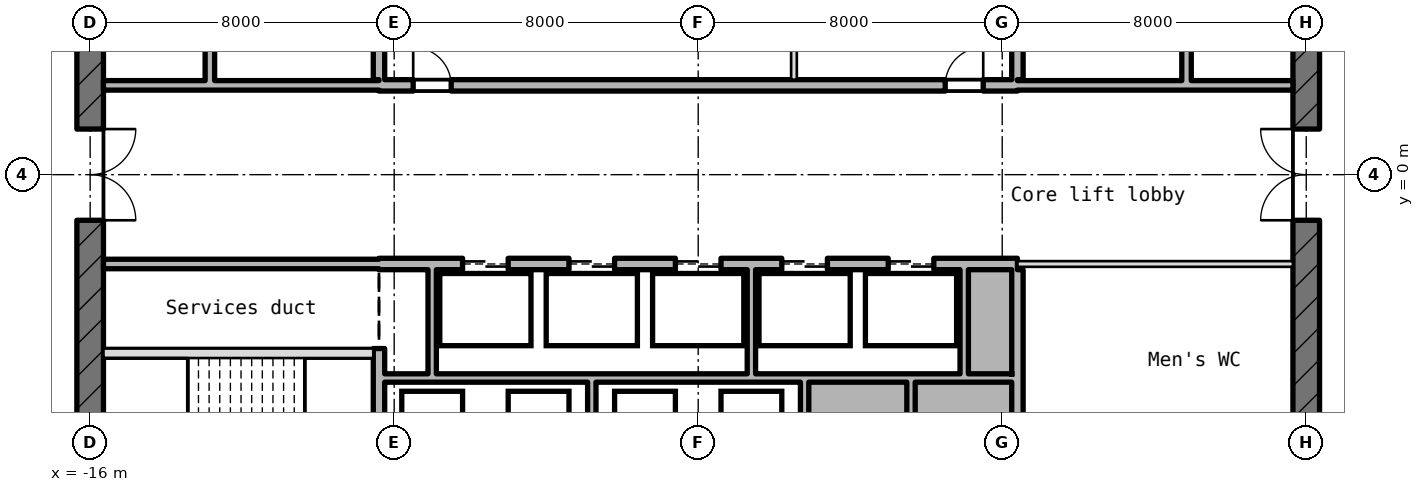
"""IFC4 building model, lengths in metres.
Left out: names, types, materials, properties, quantities, classifications, styles, units other than length and angle.
Written with IfcOpenShell. Run it as: python <this file> out.ifc"""

import sys

from ifc_helpers import new_model, si_unit, direction, frame, frame_2d, origin, place, context, subcontext, project, spatial, rectangle, extrude, element, fill, save


model = new_model("IFC4")
c1 = context("Model", 3, precision=1e-05, world=origin(), true_north=direction((0.0, 1.0)))
c2 = subcontext(c1, "Body", "Model", "MODEL_VIEW")
j1 = project(units=[si_unit("LENGTHUNIT", "METRE"), si_unit("PLANEANGLEUNIT", "RADIAN")], contexts=[c1])
p1 = place(None, origin())
s1 = spatial("IfcSite", under=j1, at=p1, CompositionType="ELEMENT")
p2 = place(p1, origin())
s2 = spatial("IfcBuilding", under=s1, at=p2, CompositionType="ELEMENT")
p3 = place(p2, frame((0.0, 0.0, 359.2)))
s3 = spatial("IfcBuildingStorey", under=s2, at=p3, CompositionType="ELEMENT", Elevation=359.2)
p4 = place(p3, frame((16.0, -10.145, -0.18), z_axis=(0.0, 0.0, 1.0), x_axis=(0.0, 1.0, 0.0)))
e1 = element("IfcWall", 1, at=p4, inside=s3, PredefinedType="SHEAR", context=c2, shape_type="SweptSolid", body=[
    extrude(rectangle(XDim=20.29, YDim=0.7, at=frame_2d((10.145, 0.0))), origin(), (0.0, 0.0, 1.0), 4.15),
])
p5 = place(p4, frame((8.945, 0.0, 0.18)))
e2 = element("IfcOpeningElement", 2, at=p5, cuts=e1, PredefinedType="OPENING", context=c2, shape_type="SweptSolid", body=[
    extrude(rectangle(XDim=2.4, YDim=2.1, at=frame_2d((1.2, 1.05))), frame((0.0, 0.36, 0.0), z_axis=(0.0, -1.0, 0.0), x_axis=(1.0, 0.0, 0.0)), (0.0, 0.0, 1.0), 0.72),
])
p6 = place(p4, frame((13.545, 0.0, 0.18)))
e3 = element("IfcOpeningElement", 3, at=p6, cuts=e1, PredefinedType="OPENING", context=c2, shape_type="SweptSolid", body=[
    extrude(rectangle(XDim=1.2, YDim=2.1, at=frame_2d((0.6, 1.05))), frame((0.0, 0.36, 0.0), z_axis=(0.0, -1.0, 0.0), x_axis=(1.0, 0.0, 0.0)), (0.0, 0.0, 1.0), 0.72),
])
p7 = place(p4, frame((2.4, 0.0, 0.18)))
e4 = element("IfcOpeningElement", 4, at=p7, cuts=e1, PredefinedType="OPENING", context=c2, shape_type="SweptSolid", body=[
    extrude(rectangle(XDim=1.2, YDim=2.1, at=frame_2d((0.6, 1.05))), frame((0.0, 0.36, 0.0), z_axis=(0.0, -1.0, 0.0), x_axis=(1.0, 0.0, 0.0)), (0.0, 0.0, 1.0), 0.72),
])
p8 = place(p3, frame((-16.0, 10.145, -0.18), z_axis=(0.0, 0.0, 1.0), x_axis=(0.0, -1.0, 0.0)))
e5 = element("IfcWall", 5, at=p8, inside=s3, PredefinedType="SHEAR", context=c2, shape_type="SweptSolid", body=[
    extrude(rectangle(XDim=20.29, YDim=0.7, at=frame_2d((10.145, 0.0))), origin(), (0.0, 0.0, 1.0), 4.15),
])
p9 = place(p8, frame((8.945, 0.0, 0.18)))
e6 = element("IfcOpeningElement", 6, at=p9, cuts=e5, PredefinedType="OPENING", context=c2, shape_type="SweptSolid", body=[
    extrude(rectangle(XDim=2.4, YDim=2.1, at=frame_2d((1.2, 1.05))), frame((0.0, 0.36, 0.0), z_axis=(0.0, -1.0, 0.0), x_axis=(1.0, 0.0, 0.0)), (0.0, 0.0, 1.0), 0.72),
])
p10 = place(p8, frame((5.545, 0.0, 0.18)))
e7 = element("IfcOpeningElement", 7, at=p10, cuts=e5, PredefinedType="OPENING", context=c2, shape_type="SweptSolid", body=[
    extrude(rectangle(XDim=1.2, YDim=2.1, at=frame_2d((0.6, 1.05))), frame((0.0, 0.36, 0.0), z_axis=(0.0, -1.0, 0.0), x_axis=(1.0, 0.0, 0.0)), (0.0, 0.0, 1.0), 0.72),
])
p11 = place(p3, frame((-8.25, -5.35, 0.0), z_axis=(0.0, 0.0, 1.0), x_axis=(1.0, 0.0, 0.0)))
e8 = element("IfcWall", 8, at=p11, inside=s3, PredefinedType="STANDARD", context=c2, shape_type="SweptSolid", body=[
    extrude(rectangle(XDim=16.5, YDim=0.22, at=frame_2d((8.25, 0.0))), origin(), (0.0, 0.0, 1.0), 3.97),
])
p12 = place(p3, frame((-15.65, -4.7, -0.18), z_axis=(0.0, 0.0, 1.0), x_axis=(1.0, 0.0, 0.0)))
e9 = element("IfcWall", 9, at=p12, inside=s3, PredefinedType="SHEAR", context=c2, shape_type="SweptSolid", body=[
    extrude(rectangle(XDim=7.1, YDim=0.25, at=frame_2d((3.55, 0.0))), origin(), (0.0, 0.0, 1.0), 4.15),
])
p13 = place(p3, frame((-15.65, -2.35, 0.0), z_axis=(0.0, 0.0, 1.0), x_axis=(1.0, 0.0, 0.0)))
e10 = element("IfcWall", 10, at=p13, inside=s3, PredefinedType="STANDARD", context=c2, shape_type="SweptSolid", body=[
    extrude(rectangle(XDim=7.25, YDim=0.25, at=frame_2d((3.625, 0.0))), origin(), (0.0, 0.0, 1.0), 3.97),
])
p14 = place(p3, frame((-8.4, -2.35, -0.18), z_axis=(0.0, 0.0, 1.0), x_axis=(1.0, 0.0, 0.0)))
e11 = element("IfcWall", 11, at=p14, inside=s3, PredefinedType="SHEAR", context=c2, shape_type="SweptSolid", body=[
    extrude(rectangle(XDim=16.8, YDim=0.3, at=frame_2d((8.4, 0.0))), origin(), (0.0, 0.0, 1.0), 4.15),
])
p15 = place(p14, frame((2.2, 0.0, 0.18)))
e12 = element("IfcOpeningElement", 12, at=p15, cuts=e11, PredefinedType="OPENING", context=c2, shape_type="SweptSolid", body=[
    extrude(rectangle(XDim=1.2, YDim=2.1, at=frame_2d((0.6, 1.05))), frame((0.0, 0.16, 0.0), z_axis=(0.0, -1.0, 0.0), x_axis=(1.0, 0.0, 0.0)), (0.0, 0.0, 1.0), 0.32),
])
p16 = place(p14, frame((5.0, 0.0, 0.18)))
e13 = element("IfcOpeningElement", 13, at=p16, cuts=e11, PredefinedType="OPENING", context=c2, shape_type="SweptSolid", body=[
    extrude(rectangle(XDim=1.2, YDim=2.1, at=frame_2d((0.6, 1.05))), frame((0.0, 0.16, 0.0), z_axis=(0.0, -1.0, 0.0), x_axis=(1.0, 0.0, 0.0)), (0.0, 0.0, 1.0), 0.32),
])
p17 = place(p14, frame((7.8, 0.0, 0.18)))
e14 = element("IfcOpeningElement", 14, at=p17, cuts=e11, PredefinedType="OPENING", context=c2, shape_type="SweptSolid", body=[
    extrude(rectangle(XDim=1.2, YDim=2.1, at=frame_2d((0.6, 1.05))), frame((0.0, 0.16, 0.0), z_axis=(0.0, -1.0, 0.0), x_axis=(1.0, 0.0, 0.0)), (0.0, 0.0, 1.0), 0.32),
])
p18 = place(p14, frame((10.6, 0.0, 0.18)))
e15 = element("IfcOpeningElement", 15, at=p18, cuts=e11, PredefinedType="OPENING", context=c2, shape_type="SweptSolid", body=[
    extrude(rectangle(XDim=1.2, YDim=2.1, at=frame_2d((0.6, 1.05))), frame((0.0, 0.16, 0.0), z_axis=(0.0, -1.0, 0.0), x_axis=(1.0, 0.0, 0.0)), (0.0, 0.0, 1.0), 0.32),
])
p19 = place(p14, frame((13.4, 0.0, 0.18)))
e16 = element("IfcOpeningElement", 16, at=p19, cuts=e11, PredefinedType="OPENING", context=c2, shape_type="SweptSolid", body=[
    extrude(rectangle(XDim=1.2, YDim=2.1, at=frame_2d((0.6, 1.05))), frame((0.0, 0.16, 0.0), z_axis=(0.0, -1.0, 0.0), x_axis=(1.0, 0.0, 0.0)), (0.0, 0.0, 1.0), 0.32),
])
p20 = place(p3, frame((8.4, -2.35, 0.0), z_axis=(0.0, 0.0, 1.0), x_axis=(1.0, 0.0, 0.0)))
e17 = element("IfcWall", 17, at=p20, inside=s3, PredefinedType="PARTITIONING", context=c2, shape_type="SweptSolid", body=[
    extrude(rectangle(XDim=7.25, YDim=0.15, at=frame_2d((3.625, 0.0))), origin(), (0.0, 0.0, 1.0), 3.97),
])
p21 = place(p3, frame((-15.65, 2.35, 0.0), z_axis=(0.0, 0.0, 1.0), x_axis=(1.0, 0.0, 0.0)))
e18 = element("IfcWall", 18, at=p21, inside=s3, PredefinedType="STANDARD", context=c2, shape_type="SweptSolid", body=[
    extrude(rectangle(XDim=7.25, YDim=0.25, at=frame_2d((3.625, 0.0))), origin(), (0.0, 0.0, 1.0), 3.97),
])
p22 = place(p3, frame((-8.4, 2.35, -0.18), z_axis=(0.0, 0.0, 1.0), x_axis=(1.0, 0.0, 0.0)))
e19 = element("IfcWall", 19, at=p22, inside=s3, PredefinedType="SHEAR", context=c2, shape_type="SweptSolid", body=[
    extrude(rectangle(XDim=16.8, YDim=0.3, at=frame_2d((8.4, 0.0))), origin(), (0.0, 0.0, 1.0), 4.15),
])
p23 = place(p22, frame((0.9, 0.0, 0.18)))
e20 = element("IfcOpeningElement", 20, at=p23, cuts=e19, PredefinedType="OPENING", context=c2, shape_type="SweptSolid", body=[
    extrude(rectangle(XDim=1.0, YDim=2.1, at=frame_2d((0.5, 1.05))), frame((0.0, 0.16, 0.0), z_axis=(0.0, -1.0, 0.0), x_axis=(1.0, 0.0, 0.0)), (0.0, 0.0, 1.0), 0.32),
])
p24 = place(p22, frame((14.9, 0.0, 0.18)))
e21 = element("IfcOpeningElement", 21, at=p24, cuts=e19, PredefinedType="OPENING", context=c2, shape_type="SweptSolid", body=[
    extrude(rectangle(XDim=1.0, YDim=2.1, at=frame_2d((0.5, 1.05))), frame((0.0, 0.16, 0.0), z_axis=(0.0, -1.0, 0.0), x_axis=(1.0, 0.0, 0.0)), (0.0, 0.0, 1.0), 0.32),
])
p25 = place(p3, frame((8.4, 2.35, 0.0), z_axis=(0.0, 0.0, 1.0), x_axis=(1.0, 0.0, 0.0)))
e22 = element("IfcWall", 22, at=p25, inside=s3, PredefinedType="STANDARD", context=c2, shape_type="SweptSolid", body=[
    extrude(rectangle(XDim=7.25, YDim=0.25, at=frame_2d((3.625, 0.0))), origin(), (0.0, 0.0, 1.0), 3.97),
])
p26 = place(p3, frame((-12.85, 2.475, 0.0), z_axis=(0.0, 0.0, 1.0), x_axis=(0.0, 1.0, 0.0)))
e23 = element("IfcWall", 23, at=p26, inside=s3, PredefinedType="STANDARD", context=c2, shape_type="SweptSolid", body=[
    extrude(rectangle(XDim=3.05, YDim=0.25, at=frame_2d((1.525, 0.0))), origin(), (0.0, 0.0, 1.0), 3.97),
])
p27 = place(p3, frame((-8.4, -8.75, -0.18), z_axis=(0.0, 0.0, 1.0), x_axis=(0.0, 1.0, 0.0)))
e24 = element("IfcWall", 24, at=p27, inside=s3, PredefinedType="SHEAR", context=c2, shape_type="SweptSolid", body=[
    extrude(rectangle(XDim=4.175, YDim=0.3, at=frame_2d((2.087, 0.0))), origin(), (0.0, 0.0, 1.0), 4.15),
])
p28 = place(p3, frame((-8.4, 2.5, -0.18), z_axis=(0.0, 0.0, 1.0), x_axis=(0.0, 1.0, 0.0)))
e25 = element("IfcWall", 25, at=p28, inside=s3, PredefinedType="SHEAR", context=c2, shape_type="SweptSolid", body=[
    extrude(rectangle(XDim=5.85, YDim=0.3, at=frame_2d((2.925, 0.0))), origin(), (0.0, 0.0, 1.0), 4.15),
])
p29 = place(p3, frame((-7.0, -5.24, 0.0), z_axis=(0.0, 0.0, 1.0), x_axis=(0.0, 1.0, 0.0)))
e26 = element("IfcWall", 26, at=p29, inside=s3, PredefinedType="STANDARD", context=c2, shape_type="SweptSolid", body=[
    extrude(rectangle(XDim=2.74, YDim=0.22, at=frame_2d((1.37, 0.0))), origin(), (0.0, 0.0, 1.0), 3.97),
])
p30 = place(p3, frame((-2.8, -8.35, 0.0), z_axis=(0.0, 0.0, 1.0), x_axis=(0.0, 1.0, 0.0)))
e27 = element("IfcWall", 27, at=p30, inside=s3, PredefinedType="STANDARD", context=c2, shape_type="SweptSolid", body=[
    extrude(rectangle(XDim=2.89, YDim=0.22, at=frame_2d((1.445, 0.0))), origin(), (0.0, 0.0, 1.0), 3.97),
])
p31 = place(p3, frame((1.4, -5.24, 0.0), z_axis=(0.0, 0.0, 1.0), x_axis=(0.0, 1.0, 0.0)))
e28 = element("IfcWall", 28, at=p31, inside=s3, PredefinedType="STANDARD", context=c2, shape_type="SweptSolid", body=[
    extrude(rectangle(XDim=2.74, YDim=0.22, at=frame_2d((1.37, 0.0))), origin(), (0.0, 0.0, 1.0), 3.97),
])
p32 = place(p3, frame((2.52, 2.5, 0.0), z_axis=(0.0, 0.0, 1.0), x_axis=(0.0, 1.0, 0.0)))
e29 = element("IfcWall", 29, at=p32, inside=s3, PredefinedType="PARTITIONING", context=c2, shape_type="SweptSolid", body=[
    extrude(rectangle(XDim=2.775, YDim=0.15, at=frame_2d((1.387, 0.0))), origin(), (0.0, 0.0, 1.0), 3.97),
])
for number, where, z_axis, x_axis in (
    (30, (2.8, -8.24, 0.0), (0.0, 0.0, 1.0), (0.0, 1.0, 0.0)),
    (31, (5.6, -8.24, 0.0), (0.0, 0.0, 1.0), (0.0, 1.0, 0.0)),
):
    element("IfcWall", number, at=place(p3, frame(where, z_axis=z_axis, x_axis=x_axis)), inside=s3, PredefinedType="STANDARD", context=c2, shape_type="SweptSolid", body=[
        extrude(rectangle(XDim=2.78, YDim=0.22, at=frame_2d((1.39, 0.0))), origin(), (0.0, 0.0, 1.0), 3.97),
    ])
p33 = place(p3, frame((7.0, -5.24, 0.0), z_axis=(0.0, 0.0, 1.0), x_axis=(0.0, 1.0, 0.0)))
e32 = element("IfcWall", 32, at=p33, inside=s3, PredefinedType="STANDARD", context=c2, shape_type="SweptSolid", body=[
    extrude(rectangle(XDim=2.74, YDim=0.22, at=frame_2d((1.37, 0.0))), origin(), (0.0, 0.0, 1.0), 3.97),
])
for number, where, z_axis, x_axis in (
    (33, (8.4, -8.35, -0.18), (0.0, 0.0, 1.0), (0.0, 1.0, 0.0)),
    (34, (8.4, 2.5, -0.18), (0.0, 0.0, 1.0), (0.0, 1.0, 0.0)),
):
    element("IfcWall", number, at=place(p3, frame(where, z_axis=z_axis, x_axis=x_axis)), inside=s3, PredefinedType="SHEAR", context=c2, shape_type="SweptSolid", body=[
        extrude(rectangle(XDim=5.85, YDim=0.3, at=frame_2d((2.925, 0.0))), origin(), (0.0, 0.0, 1.0), 4.15),
    ])
p34 = place(p3, frame((12.85, 2.475, 0.0), z_axis=(0.0, 0.0, 1.0), x_axis=(0.0, 1.0, 0.0)))
e35 = element("IfcWall", 35, at=p34, inside=s3, PredefinedType="STANDARD", context=c2, shape_type="SweptSolid", body=[
    extrude(rectangle(XDim=3.05, YDim=0.25, at=frame_2d((1.525, 0.0))), origin(), (0.0, 0.0, 1.0), 3.97),
])
p35 = place(p15, origin())
e36 = element("IfcDoor", 36, at=p35, inside=s3, OperationType="DOUBLE_DOOR_SLIDING", PredefinedType="DOOR", context=c2, shape_type="SweptSolid", body=[
    extrude(rectangle(XDim=1.2, YDim=2.1, at=frame_2d((0.6, 1.05))), frame((0.0, 0.025, 0.0), z_axis=(0.0, -1.0, 0.0), x_axis=(1.0, 0.0, 0.0)), (0.0, 0.0, 1.0), 0.05),
])
fill(e12, e36)
p36 = place(p16, origin())
e37 = element("IfcDoor", 37, at=p36, inside=s3, OperationType="DOUBLE_DOOR_SLIDING", PredefinedType="DOOR", context=c2, shape_type="SweptSolid", body=[
    extrude(rectangle(XDim=1.2, YDim=2.1, at=frame_2d((0.6, 1.05))), frame((0.0, 0.025, 0.0), z_axis=(0.0, -1.0, 0.0), x_axis=(1.0, 0.0, 0.0)), (0.0, 0.0, 1.0), 0.05),
])
fill(e13, e37)
p37 = place(p17, origin())
e38 = element("IfcDoor", 38, at=p37, inside=s3, OperationType="DOUBLE_DOOR_SLIDING", PredefinedType="DOOR", context=c2, shape_type="SweptSolid", body=[
    extrude(rectangle(XDim=1.2, YDim=2.1, at=frame_2d((0.6, 1.05))), frame((0.0, 0.025, 0.0), z_axis=(0.0, -1.0, 0.0), x_axis=(1.0, 0.0, 0.0)), (0.0, 0.0, 1.0), 0.05),
])
fill(e14, e38)
p38 = place(p18, origin())
e39 = element("IfcDoor", 39, at=p38, inside=s3, OperationType="DOUBLE_DOOR_SLIDING", PredefinedType="DOOR", context=c2, shape_type="SweptSolid", body=[
    extrude(rectangle(XDim=1.2, YDim=2.1, at=frame_2d((0.6, 1.05))), frame((0.0, 0.025, 0.0), z_axis=(0.0, -1.0, 0.0), x_axis=(1.0, 0.0, 0.0)), (0.0, 0.0, 1.0), 0.05),
])
fill(e15, e39)
p39 = place(p19, origin())
e40 = element("IfcDoor", 40, at=p39, inside=s3, OperationType="DOUBLE_DOOR_SLIDING", PredefinedType="DOOR", context=c2, shape_type="SweptSolid", body=[
    extrude(rectangle(XDim=1.2, YDim=2.1, at=frame_2d((0.6, 1.05))), frame((0.0, 0.025, 0.0), z_axis=(0.0, -1.0, 0.0), x_axis=(1.0, 0.0, 0.0)), (0.0, 0.0, 1.0), 0.05),
])
fill(e16, e40)
p40 = place(p9, origin())
e41 = element("IfcDoor", 41, at=p40, inside=s3, OperationType="DOUBLE_DOOR_SINGLE_SWING", PredefinedType="DOOR", context=c2, shape_type="SweptSolid", body=[
    extrude(rectangle(XDim=2.4, YDim=2.1, at=frame_2d((1.2, 1.05))), frame((0.0, 0.025, 0.0), z_axis=(0.0, -1.0, 0.0), x_axis=(1.0, 0.0, 0.0)), (0.0, 0.0, 1.0), 0.05),
])
fill(e6, e41)
p41 = place(p5, origin())
e42 = element("IfcDoor", 42, at=p41, inside=s3, OperationType="DOUBLE_DOOR_SINGLE_SWING", PredefinedType="DOOR", context=c2, shape_type="SweptSolid", body=[
    extrude(rectangle(XDim=2.4, YDim=2.1, at=frame_2d((1.2, 1.05))), frame((0.0, 0.025, 0.0), z_axis=(0.0, -1.0, 0.0), x_axis=(1.0, 0.0, 0.0)), (0.0, 0.0, 1.0), 0.05),
])
fill(e2, e42)
p42 = place(p23, origin())
e43 = element("IfcDoor", 43, at=p42, inside=s3, OperationType="SINGLE_SWING_RIGHT", PredefinedType="DOOR", context=c2, shape_type="SweptSolid", body=[
    extrude(rectangle(XDim=1.0, YDim=2.1, at=frame_2d((0.5, 1.05))), frame((0.0, 0.025, 0.0), z_axis=(0.0, -1.0, 0.0), x_axis=(1.0, 0.0, 0.0)), (0.0, 0.0, 1.0), 0.05),
])
fill(e20, e43)
p43 = place(p24, origin())
e44 = element("IfcDoor", 44, at=p43, inside=s3, OperationType="SINGLE_SWING_RIGHT", PredefinedType="DOOR", context=c2, shape_type="SweptSolid", body=[
    extrude(rectangle(XDim=1.0, YDim=2.1, at=frame_2d((0.5, 1.05))), frame((0.0, 0.025, 0.0), z_axis=(0.0, -1.0, 0.0), x_axis=(1.0, 0.0, 0.0)), (0.0, 0.0, 1.0), 0.05),
])
fill(e21, e44)
save(model, sys.argv[1])
